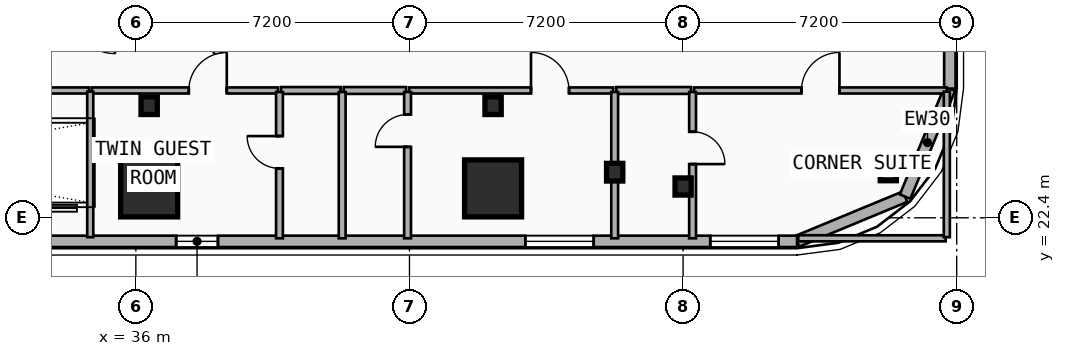
"""IFC4 building model, lengths in metres.
Left out: names, types, materials, properties, quantities, classifications, styles, units other than length and angle.
Written with IfcOpenShell. Run it as: python <this file> out.ifc"""

import sys

from ifc_helpers import new_model, si_unit, direction, frame, frame_2d, origin, origin_2d, place, context, subcontext, project, spatial, rectangle, i_section, extrude, element, fill, save


model = new_model("IFC4")
c1 = context("Model", 3, precision=1e-05, world=origin(), true_north=direction((0.0, 1.0)))
c2 = subcontext(c1, "Body", "Model", "MODEL_VIEW")
j1 = project(units=[si_unit("LENGTHUNIT", "METRE"), si_unit("PLANEANGLEUNIT", "RADIAN")], contexts=[c1])
p1 = place(None, origin())
s1 = spatial("IfcSite", under=j1, at=p1, CompositionType="ELEMENT")
p2 = place(p1, origin())
s2 = spatial("IfcBuilding", under=s1, at=p2, CompositionType="ELEMENT")
p3 = place(p2, frame((0.0, 0.0, 32.5)))
s3 = spatial("IfcBuildingStorey", under=s2, at=p3, CompositionType="ELEMENT", Elevation=32.5)
for number, where, z_axis, x_axis in (
    (1, (36.35, 25.35, 0.0), (0.0, 0.0, 1.0), (1.0, 0.0, 0.0)),
    (2, (45.4, 25.35, 0.0), (0.0, 0.0, 1.0), (1.0, 0.0, 0.0)),
):
    element("IfcColumn", number, at=place(p3, frame(where, z_axis=z_axis, x_axis=x_axis)), inside=s3, PredefinedType="COLUMN", context=c2, shape_type="SweptSolid", body=[
        extrude(i_section(OverallWidth=0.428, OverallDepth=0.465, WebThickness=0.045, FlangeThickness=0.073, FilletRadius=0.015, at=origin_2d()), origin(), (0.0, 0.0, 1.0), 3.5),
    ])
for number, where, z_axis, x_axis in (
    (3, (36.35, 23.283, 0.0), (0.0, -0.09, 0.996), (1.0, 0.0, 0.0)),
    (4, (45.4, 23.283, 0.0), (0.0, -0.09, 0.996), (1.0, 0.0, 0.0)),
):
    element("IfcColumn", number, at=place(p3, frame(where, z_axis=z_axis, x_axis=x_axis)), inside=s3, PredefinedType="COLUMN", context=c2, shape_type="SweptSolid", body=[
        extrude(rectangle(XDim=1.5, YDim=1.5, at=origin_2d()), origin(), (0.0, 0.0, 1.0), 3.514),
    ])
p4 = place(p3, frame((48.6, 23.6, 0.0), z_axis=(0.0, 0.0, 1.0), x_axis=(1.0, 0.0, 0.0)))
e5 = element("IfcColumn", 5, at=p4, inside=s3, PredefinedType="COLUMN", context=c2, shape_type="SweptSolid", body=[
    extrude(i_section(OverallWidth=0.428, OverallDepth=0.465, WebThickness=0.045, FlangeThickness=0.073, FilletRadius=0.015, at=origin_2d()), origin(), (0.0, 0.0, 1.0), 3.5),
])
p5 = place(p3, frame((50.4, 23.32, 0.0), z_axis=(0.0, -0.079891690793, 0.996803550226), x_axis=(1.0, 0.0, 0.0)))
e6 = element("IfcColumn", 6, at=p5, inside=s3, PredefinedType="COLUMN", context=c2, shape_type="SweptSolid", body=[
    extrude(i_section(OverallWidth=0.424, OverallDepth=0.45, WebThickness=0.041, FlangeThickness=0.065, FilletRadius=0.015, at=origin_2d()), origin(), (0.0, 0.0, 1.0), 3.511),
])
p6 = place(p3, frame((55.8, 23.6, 0.0), z_axis=(0.0, 0.0, 1.0), x_axis=(1.0, 0.0, 0.0)))
e7 = element("IfcColumn", 7, at=p6, inside=s3, PredefinedType="COLUMN", context=c2, shape_type="SweptSolid", body=[
    extrude(i_section(OverallWidth=0.424, OverallDepth=0.45, WebThickness=0.041, FlangeThickness=0.065, FilletRadius=0.015, at=origin_2d()), origin(), (0.0, 0.0, 1.0), 3.5),
])
p7 = place(p3, frame((56.243, 22.958, 0.0), z_axis=(0.0, 0.0, 1.0), x_axis=(-0.923882414032, -0.382676475685, 0.0)))
e8 = element("IfcWall", 8, at=p7, inside=s3, PredefinedType="SOLIDWALL", context=c2, shape_type="SweptSolid", body=[
    extrude(rectangle(XDim=3.077, YDim=0.3, at=frame_2d((1.539, 0.0))), origin(), (0.0, 0.0, 1.0), 3.24),
])
p8 = place(p3, frame((57.42, 25.8, 0.0), z_axis=(0.0, 0.0, 1.0), x_axis=(-0.382636798336, -0.92389884758, 0.0)))
e9 = element("IfcWall", 9, at=p8, inside=s3, PredefinedType="SOLIDWALL", context=c2, shape_type="SweptSolid", body=[
    extrude(rectangle(XDim=3.077, YDim=0.3, at=frame_2d((1.538, 0.0))), origin(), (0.0, 0.0, 1.0), 3.24),
])
p9 = place(p3, frame((57.42, 41.0, 0.0), z_axis=(0.0, 0.0, 1.0), x_axis=(0.0, -1.0, 0.0)))
e10 = element("IfcWall", 10, at=p9, inside=s3, PredefinedType="SOLIDWALL", context=c2, shape_type="SweptSolid", body=[
    extrude(rectangle(XDim=15.2, YDim=0.3, at=frame_2d((7.6, 0.0))), origin(), (0.0, 0.0, 1.0), 3.24),
])
p10 = place(p9, frame((10.882, 0.0, 0.48)))
e11 = element("IfcOpeningElement", 11, at=p10, cuts=e10, PredefinedType="OPENING", context=c2, shape_type="SweptSolid", body=[
    extrude(rectangle(XDim=1.4, YDim=1.8, at=frame_2d((0.7, 0.9))), frame((0.0, 0.16, 0.0), z_axis=(0.0, -1.0, 0.0), x_axis=(1.0, 0.0, 0.0)), (0.0, 0.0, 1.0), 0.32),
])
p11 = place(p9, frame((5.621, 0.0, 0.48)))
e12 = element("IfcOpeningElement", 12, at=p11, cuts=e10, PredefinedType="OPENING", context=c2, shape_type="SweptSolid", body=[
    extrude(rectangle(XDim=1.4, YDim=1.8, at=frame_2d((0.7, 0.9))), frame((0.0, 0.16, 0.0), z_axis=(0.0, -1.0, 0.0), x_axis=(1.0, 0.0, 0.0)), (0.0, 0.0, 1.0), 0.32),
])
p12 = place(p3, frame((53.4, 21.78, 0.0), z_axis=(0.0, 0.0, 1.0), x_axis=(-1.0, 0.0, 0.0)))
e13 = element("IfcWall", 13, at=p12, inside=s3, PredefinedType="SOLIDWALL", context=c2, shape_type="SweptSolid", body=[
    extrude(rectangle(XDim=49.2, YDim=0.3, at=frame_2d((24.6, 0.0))), origin(), (0.0, 0.0, 1.0), 3.24),
])
p13 = place(p12, frame((46.915, 0.0, 0.65)))
e14 = element("IfcOpeningElement", 14, at=p13, cuts=e13, PredefinedType="OPENING", context=c2, shape_type="SweptSolid", body=[
    extrude(rectangle(XDim=1.8, YDim=1.8, at=frame_2d((0.9, 0.9))), frame((0.0, 0.16, 0.0), z_axis=(0.0, -1.0, 0.0), x_axis=(1.0, 0.0, 0.0)), (0.0, 0.0, 1.0), 0.32),
])
p14 = place(p12, frame((42.048, 0.0, 0.65)))
e15 = element("IfcOpeningElement", 15, at=p14, cuts=e13, PredefinedType="OPENING", context=c2, shape_type="SweptSolid", body=[
    extrude(rectangle(XDim=1.8, YDim=1.8, at=frame_2d((0.9, 0.9))), frame((0.0, 0.16, 0.0), z_axis=(0.0, -1.0, 0.0), x_axis=(1.0, 0.0, 0.0)), (0.0, 0.0, 1.0), 0.32),
])
p15 = place(p12, frame((32.696, 0.0, 0.48)))
e16 = element("IfcOpeningElement", 16, at=p15, cuts=e13, PredefinedType="OPENING", context=c2, shape_type="SweptSolid", body=[
    extrude(rectangle(XDim=1.2, YDim=1.5, at=frame_2d((0.6, 0.75))), frame((0.0, 0.16, 0.0), z_axis=(0.0, -1.0, 0.0), x_axis=(1.0, 0.0, 0.0)), (0.0, 0.0, 1.0), 0.32),
])
p16 = place(p12, frame((15.239, 0.0, 1.22)))
e17 = element("IfcOpeningElement", 17, at=p16, cuts=e13, PredefinedType="OPENING", context=c2, shape_type="SweptSolid", body=[
    extrude(rectangle(XDim=1.1, YDim=1.05, at=frame_2d((0.55, 0.525))), frame((0.0, 0.16, 0.0), z_axis=(0.0, -1.0, 0.0), x_axis=(1.0, 0.0, 0.0)), (0.0, 0.0, 1.0), 0.32),
])
p17 = place(p12, frame((5.352, 0.0, 0.65)))
e18 = element("IfcOpeningElement", 18, at=p17, cuts=e13, PredefinedType="OPENING", context=c2, shape_type="SweptSolid", body=[
    extrude(rectangle(XDim=1.8, YDim=1.8, at=frame_2d((0.9, 0.9))), frame((0.0, 0.16, 0.0), z_axis=(0.0, -1.0, 0.0), x_axis=(1.0, 0.0, 0.0)), (0.0, 0.0, 1.0), 0.32),
])
p18 = place(p12, frame((0.485, 0.0, 0.65)))
e19 = element("IfcOpeningElement", 19, at=p18, cuts=e13, PredefinedType="OPENING", context=c2, shape_type="SweptSolid", body=[
    extrude(rectangle(XDim=1.8, YDim=1.8, at=frame_2d((0.9, 0.9))), frame((0.0, 0.16, 0.0), z_axis=(0.0, -1.0, 0.0), x_axis=(1.0, 0.0, 0.0)), (0.0, 0.0, 1.0), 0.32),
])
p19 = place(p3, frame((34.84, 25.75, 0.0), z_axis=(0.0, 0.0, 1.0), x_axis=(1.0, 0.0, 0.0)))
e20 = element("IfcWall", 20, at=p19, inside=s3, PredefinedType="PARTITIONING", context=c2, shape_type="SweptSolid", body=[
    extrude(rectangle(XDim=4.899, YDim=0.16, at=frame_2d((2.449, 0.0))), origin(), (0.0, 0.0, 1.0), 2.28),
])
p20 = place(p19, frame((2.553, 0.0, 0.0)))
e21 = element("IfcOpeningElement", 21, at=p20, cuts=e20, PredefinedType="OPENING", context=c2, shape_type="SweptSolid", body=[
    extrude(rectangle(XDim=1.0, YDim=2.15, at=frame_2d((0.5, 1.075))), frame((0.0, 0.09, 0.0), z_axis=(0.0, -1.0, 0.0), x_axis=(1.0, 0.0, 0.0)), (0.0, 0.0, 1.0), 0.18),
])
p21 = place(p3, frame((39.819, 25.75, 0.0), z_axis=(0.0, 0.0, 1.0), x_axis=(1.0, 0.0, 0.0)))
e22 = element("IfcWall", 22, at=p21, inside=s3, PredefinedType="PLUMBINGWALL", context=c2, shape_type="SweptSolid", body=[
    extrude(rectangle(XDim=1.57, YDim=0.18, at=frame_2d((0.785, 0.0))), origin(), (0.0, 0.0, 1.0), 3.24),
])
p22 = place(p3, frame((43.19, 25.75, 0.0), z_axis=(0.0, 0.0, 1.0), x_axis=(1.0, 0.0, 0.0)))
e23 = element("IfcWall", 23, at=p22, inside=s3, PredefinedType="PARTITIONING", context=c2, shape_type="SweptSolid", body=[
    extrude(rectangle(XDim=5.37, YDim=0.16, at=frame_2d((2.685, 0.0))), origin(), (0.0, 0.0, 1.0), 2.28),
])
p23 = place(p22, frame((3.208, 0.0, 0.0)))
e24 = element("IfcOpeningElement", 24, at=p23, cuts=e23, PredefinedType="OPENING", context=c2, shape_type="SweptSolid", body=[
    extrude(rectangle(XDim=1.0, YDim=2.15, at=frame_2d((0.5, 1.075))), frame((0.0, 0.09, 0.0), z_axis=(0.0, -1.0, 0.0), x_axis=(1.0, 0.0, 0.0)), (0.0, 0.0, 1.0), 0.18),
])
p24 = place(p3, frame((41.469, 25.75, 0.0), z_axis=(0.0, 0.0, 1.0), x_axis=(1.0, 0.0, 0.0)))
e25 = element("IfcWall", 25, at=p24, inside=s3, PredefinedType="PLUMBINGWALL", context=c2, shape_type="SweptSolid", body=[
    extrude(rectangle(XDim=1.641, YDim=0.18, at=frame_2d((0.821, 0.0))), origin(), (0.0, 0.0, 1.0), 3.24),
])
p25 = place(p3, frame((50.69, 25.75, 0.0), z_axis=(0.0, 0.0, 1.0), x_axis=(1.0, 0.0, 0.0)))
e26 = element("IfcWall", 26, at=p25, inside=s3, PredefinedType="PARTITIONING", context=c2, shape_type="SweptSolid", body=[
    extrude(rectangle(XDim=6.65, YDim=0.16, at=frame_2d((3.325, 0.0))), origin(), (0.0, 0.0, 1.0), 2.57),
])
p26 = place(p25, frame((2.825, 0.0, 0.0)))
e27 = element("IfcOpeningElement", 27, at=p26, cuts=e26, PredefinedType="OPENING", context=c2, shape_type="SweptSolid", body=[
    extrude(rectangle(XDim=1.0, YDim=2.15, at=frame_2d((0.5, 1.075))), frame((0.0, 0.09, 0.0), z_axis=(0.0, -1.0, 0.0), x_axis=(1.0, 0.0, 0.0)), (0.0, 0.0, 1.0), 0.18),
])
p27 = place(p3, frame((48.64, 25.75, 0.0), z_axis=(0.0, 0.0, 1.0), x_axis=(1.0, 0.0, 0.0)))
e28 = element("IfcWall", 28, at=p27, inside=s3, PredefinedType="PLUMBINGWALL", context=c2, shape_type="SweptSolid", body=[
    extrude(rectangle(XDim=1.97, YDim=0.18, at=frame_2d((0.985, 0.0))), origin(), (0.0, 0.0, 1.0), 2.57),
])
p28 = place(p3, frame((39.779, 21.86, 0.0), z_axis=(0.0, 0.0, 1.0), x_axis=(0.0, 1.0, 0.0)))
e29 = element("IfcWall", 29, at=p28, inside=s3, PredefinedType="PLUMBINGWALL", context=c2, shape_type="SweptSolid", body=[
    extrude(rectangle(XDim=3.85, YDim=0.18, at=frame_2d((1.925, 0.0))), origin(), (0.0, 0.0, 1.0), 2.82),
])
p29 = place(p28, frame((1.84, 0.0, 0.0)))
e30 = element("IfcOpeningElement", 30, at=p29, cuts=e29, PredefinedType="OPENING", context=c2, shape_type="SweptSolid", body=[
    extrude(rectangle(XDim=0.85, YDim=2.1, at=frame_2d((0.425, 1.05))), frame((0.0, 0.1, 0.0), z_axis=(0.0, -1.0, 0.0), x_axis=(1.0, 0.0, 0.0)), (0.0, 0.0, 1.0), 0.2),
])
p30 = place(p3, frame((41.429, 21.86, 0.0), z_axis=(0.0, 0.0, 1.0), x_axis=(0.0, 1.0, 0.0)))
e31 = element("IfcWall", 31, at=p30, inside=s3, PredefinedType="PLUMBINGWALL", context=c2, shape_type="SweptSolid", body=[
    extrude(rectangle(XDim=3.85, YDim=0.18, at=frame_2d((1.925, 0.0))), origin(), (0.0, 0.0, 1.0), 2.82),
])
p31 = place(p3, frame((43.15, 21.86, 0.0), z_axis=(0.0, 0.0, 1.0), x_axis=(0.0, 1.0, 0.0)))
e32 = element("IfcWall", 32, at=p31, inside=s3, PredefinedType="PLUMBINGWALL", context=c2, shape_type="SweptSolid", body=[
    extrude(rectangle(XDim=3.85, YDim=0.18, at=frame_2d((1.925, 0.0))), origin(), (0.0, 0.0, 1.0), 2.82),
])
p32 = place(p31, frame((2.407, 0.0, 0.0)))
e33 = element("IfcOpeningElement", 33, at=p32, cuts=e32, PredefinedType="OPENING", context=c2, shape_type="SweptSolid", body=[
    extrude(rectangle(XDim=0.85, YDim=2.1, at=frame_2d((0.425, 1.05))), frame((0.0, 0.1, 0.0), z_axis=(0.0, -1.0, 0.0), x_axis=(1.0, 0.0, 0.0)), (0.0, 0.0, 1.0), 0.2),
])
p33 = place(p3, frame((48.6, 21.86, 0.0), z_axis=(0.0, 0.0, 1.0), x_axis=(0.0, 1.0, 0.0)))
e34 = element("IfcWall", 34, at=p33, inside=s3, PredefinedType="PLUMBINGWALL", context=c2, shape_type="SweptSolid", body=[
    extrude(rectangle(XDim=3.85, YDim=0.18, at=frame_2d((1.925, 0.0))), origin(), (0.0, 0.0, 1.0), 2.72),
])
p34 = place(p3, frame((50.65, 25.71, 0.0), z_axis=(0.0, 0.0, 1.0), x_axis=(0.0, -1.0, 0.0)))
e35 = element("IfcWall", 35, at=p34, inside=s3, PredefinedType="PLUMBINGWALL", context=c2, shape_type="SweptSolid", body=[
    extrude(rectangle(XDim=3.85, YDim=0.18, at=frame_2d((1.925, 0.0))), origin(), (0.0, 0.0, 1.0), 2.57),
])
p35 = place(p34, frame((1.047, 0.0, 0.0)))
e36 = element("IfcOpeningElement", 36, at=p35, cuts=e35, PredefinedType="OPENING", context=c2, shape_type="SweptSolid", body=[
    extrude(rectangle(XDim=0.85, YDim=2.1, at=frame_2d((0.425, 1.05))), frame((0.0, 0.1, 0.0), z_axis=(0.0, -1.0, 0.0), x_axis=(1.0, 0.0, 0.0)), (0.0, 0.0, 1.0), 0.2),
])
p36 = place(p3, frame((22.83, 25.75, 0.0), z_axis=(0.0, 0.0, 1.0), x_axis=(1.0, 0.0, 0.0)))
e37 = element("IfcWall", 37, at=p36, inside=s3, PredefinedType="PARTITIONING", context=c2, shape_type="SweptSolid", body=[
    extrude(rectangle(XDim=11.94, YDim=0.16, at=frame_2d((5.97, 0.0))), origin(), (0.0, 0.0, 1.0), 3.24),
])
p37 = place(p3, frame((34.8, 21.89, 0.0), z_axis=(0.0, 0.0, 1.0), x_axis=(0.0, 1.0, 0.0)))
e38 = element("IfcWall", 38, at=p37, inside=s3, PredefinedType="PARTITIONING", context=c2, shape_type="SweptSolid", body=[
    extrude(rectangle(XDim=3.83, YDim=0.16, at=frame_2d((1.915, 0.0))), origin(), (0.0, 0.0, 1.0), 2.82),
])
p38 = place(p3, frame((53.43, 21.86, 0.0), z_axis=(0.0, 0.0, 1.0), x_axis=(1.0, 0.0, 0.0)))
e39 = element("IfcWall", 39, at=p38, inside=s3, PredefinedType="PARTITIONING", context=c2, shape_type="SweptSolid", body=[
    extrude(rectangle(XDim=3.88, YDim=0.16, at=frame_2d((1.94, 0.0))), origin(), (0.0, 0.0, 1.0), 3.24),
])
p39 = place(p3, frame((57.34, 21.89, 0.0), z_axis=(0.0, 0.0, 1.0), x_axis=(0.0, 1.0, 0.0)))
e40 = element("IfcWall", 40, at=p39, inside=s3, PredefinedType="PARTITIONING", context=c2, shape_type="SweptSolid", body=[
    extrude(rectangle(XDim=3.83, YDim=0.16, at=frame_2d((1.915, 0.0))), origin(), (0.0, 0.0, 1.0), 3.24),
])
p40 = place(p16, origin())
e41 = element("IfcWindow", 41, at=p40, inside=s3, PartitioningType="SINGLE_PANEL", PredefinedType="WINDOW", context=c2, shape_type="SweptSolid", body=[
    extrude(rectangle(XDim=1.1, YDim=1.05, at=frame_2d((0.55, 0.525))), frame((0.0, 0.03, 0.0), z_axis=(0.0, -1.0, 0.0), x_axis=(1.0, 0.0, 0.0)), (0.0, 0.0, 1.0), 0.06),
])
fill(e17, e41)
p41 = place(p17, origin())
e42 = element("IfcWindow", 42, at=p41, inside=s3, PartitioningType="SINGLE_PANEL", PredefinedType="WINDOW", context=c2, shape_type="SweptSolid", body=[
    extrude(rectangle(XDim=1.8, YDim=1.8, at=frame_2d((0.9, 0.9))), frame((0.0, 0.03, 0.0), z_axis=(0.0, -1.0, 0.0), x_axis=(1.0, 0.0, 0.0)), (0.0, 0.0, 1.0), 0.06),
])
fill(e18, e42)
p42 = place(p18, origin())
e43 = element("IfcWindow", 43, at=p42, inside=s3, PartitioningType="SINGLE_PANEL", PredefinedType="WINDOW", context=c2, shape_type="SweptSolid", body=[
    extrude(rectangle(XDim=1.8, YDim=1.8, at=frame_2d((0.9, 0.9))), frame((0.0, 0.03, 0.0), z_axis=(0.0, -1.0, 0.0), x_axis=(1.0, 0.0, 0.0)), (0.0, 0.0, 1.0), 0.06),
])
fill(e19, e43)
p43 = place(p20, origin())
e44 = element("IfcDoor", 44, at=p43, inside=s3, OperationType="SINGLE_SWING_RIGHT", PredefinedType="DOOR", context=c2, shape_type="SweptSolid", body=[
    extrude(rectangle(XDim=1.0, YDim=2.15, at=frame_2d((0.5, 1.075))), frame((0.0, 0.025, 0.0), z_axis=(0.0, -1.0, 0.0), x_axis=(1.0, 0.0, 0.0)), (0.0, 0.0, 1.0), 0.05),
])
fill(e21, e44)
p44 = place(p23, origin())
e45 = element("IfcDoor", 45, at=p44, inside=s3, OperationType="SINGLE_SWING_LEFT", PredefinedType="DOOR", context=c2, shape_type="SweptSolid", body=[
    extrude(rectangle(XDim=1.0, YDim=2.15, at=frame_2d((0.5, 1.075))), frame((0.0, 0.025, 0.0), z_axis=(0.0, -1.0, 0.0), x_axis=(1.0, 0.0, 0.0)), (0.0, 0.0, 1.0), 0.05),
])
fill(e24, e45)
p45 = place(p26, origin())
e46 = element("IfcDoor", 46, at=p45, inside=s3, OperationType="SINGLE_SWING_RIGHT", PredefinedType="DOOR", context=c2, shape_type="SweptSolid", body=[
    extrude(rectangle(XDim=1.0, YDim=2.15, at=frame_2d((0.5, 1.075))), frame((0.0, 0.025, 0.0), z_axis=(0.0, -1.0, 0.0), x_axis=(1.0, 0.0, 0.0)), (0.0, 0.0, 1.0), 0.05),
])
fill(e27, e46)
p46 = place(p29, origin())
e47 = element("IfcDoor", 47, at=p46, inside=s3, OperationType="SINGLE_SWING_RIGHT", PredefinedType="DOOR", context=c2, shape_type="SweptSolid", body=[
    extrude(rectangle(XDim=0.85, YDim=2.1, at=frame_2d((0.425, 1.05))), frame((0.0, 0.025, 0.0), z_axis=(0.0, -1.0, 0.0), x_axis=(1.0, 0.0, 0.0)), (0.0, 0.0, 1.0), 0.05),
])
fill(e30, e47)
p47 = place(p32, origin())
e48 = element("IfcDoor", 48, at=p47, inside=s3, OperationType="SINGLE_SWING_LEFT", PredefinedType="DOOR", context=c2, shape_type="SweptSolid", body=[
    extrude(rectangle(XDim=0.85, YDim=2.1, at=frame_2d((0.425, 1.05))), frame((0.0, 0.025, 0.0), z_axis=(0.0, -1.0, 0.0), x_axis=(1.0, 0.0, 0.0)), (0.0, 0.0, 1.0), 0.05),
])
fill(e33, e48)
p48 = place(p35, origin())
e49 = element("IfcDoor", 49, at=p48, inside=s3, OperationType="SINGLE_SWING_RIGHT", PredefinedType="DOOR", context=c2, shape_type="SweptSolid", body=[
    extrude(rectangle(XDim=0.85, YDim=2.1, at=frame_2d((0.425, 1.05))), frame((0.0, 0.025, 0.0), z_axis=(0.0, -1.0, 0.0), x_axis=(1.0, 0.0, 0.0)), (0.0, 0.0, 1.0), 0.05),
])
fill(e36, e49)
save(model, sys.argv[1])
